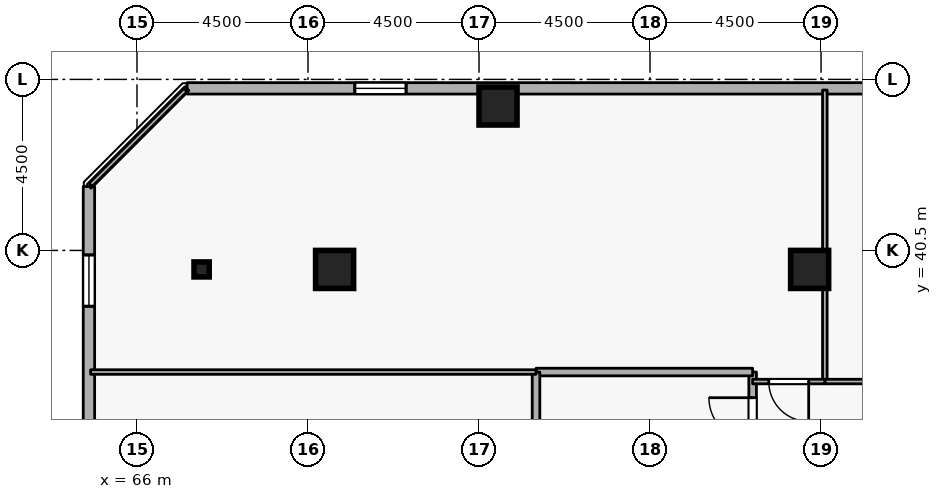
"""IFC4 building model, lengths in metres.
Left out: names, types, materials, properties, quantities, classifications, styles, units other than length and angle.
Written with IfcOpenShell. Run it as: python <this file> out.ifc"""

import sys

from ifc_helpers import new_model, si_unit, direction, frame, frame_2d, origin, origin_2d, place, context, subcontext, project, spatial, rectangle, i_section, extrude, element, fill, save


model = new_model("IFC4")
c1 = context("Model", 3, precision=1e-05, world=origin(), true_north=direction((0.0, 1.0)))
c2 = subcontext(c1, "Body", "Model", "MODEL_VIEW")
j1 = project(units=[si_unit("LENGTHUNIT", "METRE"), si_unit("PLANEANGLEUNIT", "RADIAN")], contexts=[c1])
p1 = place(None, origin())
s1 = spatial("IfcSite", under=j1, at=p1, CompositionType="ELEMENT")
p2 = place(p1, origin())
s2 = spatial("IfcBuilding", under=s1, at=p2, CompositionType="ELEMENT")
p3 = place(p2, frame((0.0, 0.0, 225.9)))
s3 = spatial("IfcBuildingStorey", under=s2, at=p3, CompositionType="ELEMENT", Elevation=225.9)
for number, where, z_axis, x_axis in (
    (1, (75.5, 44.3, 0.0), (0.0, 0.0, 1.0), (1.0, 0.0, 0.0)),
    (2, (71.2, 40.0, 0.0), (0.0, 0.0, 1.0), (1.0, 0.0, 0.0)),
    (3, (83.7, 40.0, 0.0), (0.0, 0.0, 1.0), (1.0, 0.0, 0.0)),
):
    element("IfcColumn", number, at=place(p3, frame(where, z_axis=z_axis, x_axis=x_axis)), inside=s3, PredefinedType="COLUMN", context=c2, shape_type="SweptSolid", body=[
        extrude(rectangle(XDim=1.0, YDim=1.0, at=origin_2d()), origin(), (0.0, 0.0, 1.0), 3.6),
    ])
p4 = place(p3, frame((67.7, 40.0, 0.0), z_axis=(0.0, 0.0, 1.0), x_axis=(1.0, 0.0, 0.0)))
e4 = element("IfcColumn", 4, at=p4, inside=s3, PredefinedType="COLUMN", context=c2, shape_type="SweptSolid", body=[
    extrude(i_section(OverallWidth=0.399, OverallDepth=0.394, WebThickness=0.023, FlangeThickness=0.037, FilletRadius=0.015, at=origin_2d()), origin(), (0.0, 0.0, 1.0), 3.6),
])
p5 = place(p3, frame((103.681, 44.765, 0.0), z_axis=(0.0, 0.0, 1.0), x_axis=(-1.0, 0.0, 0.0)))
e5 = element("IfcWall", 5, at=p5, inside=s3, PredefinedType="STANDARD", context=c2, shape_type="SweptSolid", body=[
    extrude(rectangle(XDim=36.363, YDim=0.3, at=frame_2d((18.181, 0.0))), origin(), (0.0, 0.0, 1.0), 2.22),
])
p6 = place(p5, frame((30.6, 0.0, 0.72)))
e6 = element("IfcOpeningElement", 6, at=p6, cuts=e5, PredefinedType="OPENING", context=c2, shape_type="SweptSolid", body=[
    extrude(rectangle(XDim=1.35, YDim=1.05, at=frame_2d((0.675, 0.525))), frame((0.0, 0.16, 0.0), z_axis=(0.0, -1.0, 0.0), x_axis=(1.0, 0.0, 0.0)), (0.0, 0.0, 1.0), 0.32),
])
p7 = place(p3, frame((64.735, 42.181, 0.0), z_axis=(0.0, 0.0, 1.0), x_axis=(0.0, -1.0, 0.0)))
e7 = element("IfcWall", 7, at=p7, inside=s3, PredefinedType="STANDARD", context=c2, shape_type="SweptSolid", body=[
    extrude(rectangle(XDim=36.363, YDim=0.3, at=frame_2d((18.181, 0.0))), origin(), (0.0, 0.0, 1.0), 2.22),
])
p8 = place(p7, frame((1.8, 0.0, 0.72)))
e8 = element("IfcOpeningElement", 8, at=p8, cuts=e7, PredefinedType="OPENING", context=c2, shape_type="SweptSolid", body=[
    extrude(rectangle(XDim=1.35, YDim=1.05, at=frame_2d((0.675, 0.525))), frame((0.0, 0.16, 0.0), z_axis=(0.0, -1.0, 0.0), x_axis=(1.0, 0.0, 0.0)), (0.0, 0.0, 1.0), 0.32),
])
p9 = place(p7, frame((6.6, 0.0, 0.72)))
e9 = element("IfcOpeningElement", 9, at=p9, cuts=e7, PredefinedType="OPENING", context=c2, shape_type="SweptSolid", body=[
    extrude(rectangle(XDim=1.35, YDim=1.05, at=frame_2d((0.675, 0.525))), frame((0.0, 0.16, 0.0), z_axis=(0.0, -1.0, 0.0), x_axis=(1.0, 0.0, 0.0)), (0.0, 0.0, 1.0), 0.32),
])
p10 = place(p7, frame((11.4, 0.0, 0.72)))
e10 = element("IfcOpeningElement", 10, at=p10, cuts=e7, PredefinedType="OPENING", context=c2, shape_type="SweptSolid", body=[
    extrude(rectangle(XDim=1.35, YDim=1.05, at=frame_2d((0.675, 0.525))), frame((0.0, 0.16, 0.0), z_axis=(0.0, -1.0, 0.0), x_axis=(1.0, 0.0, 0.0)), (0.0, 0.0, 1.0), 0.32),
])
p11 = place(p7, frame((16.2, 0.0, 0.72)))
e11 = element("IfcOpeningElement", 11, at=p11, cuts=e7, PredefinedType="OPENING", context=c2, shape_type="SweptSolid", body=[
    extrude(rectangle(XDim=1.35, YDim=1.05, at=frame_2d((0.675, 0.525))), frame((0.0, 0.16, 0.0), z_axis=(0.0, -1.0, 0.0), x_axis=(1.0, 0.0, 0.0)), (0.0, 0.0, 1.0), 0.32),
])
p12 = place(p7, frame((21.0, 0.0, 0.72)))
e12 = element("IfcOpeningElement", 12, at=p12, cuts=e7, PredefinedType="OPENING", context=c2, shape_type="SweptSolid", body=[
    extrude(rectangle(XDim=1.35, YDim=1.05, at=frame_2d((0.675, 0.525))), frame((0.0, 0.16, 0.0), z_axis=(0.0, -1.0, 0.0), x_axis=(1.0, 0.0, 0.0)), (0.0, 0.0, 1.0), 0.32),
])
p13 = place(p7, frame((30.6, 0.0, 0.72)))
e13 = element("IfcOpeningElement", 13, at=p13, cuts=e7, PredefinedType="OPENING", context=c2, shape_type="SweptSolid", body=[
    extrude(rectangle(XDim=1.35, YDim=1.05, at=frame_2d((0.675, 0.525))), frame((0.0, 0.16, 0.0), z_axis=(0.0, -1.0, 0.0), x_axis=(1.0, 0.0, 0.0)), (0.0, 0.0, 1.0), 0.32),
])
p14 = place(p3, frame((82.2, 34.8, 0.0), z_axis=(0.0, 0.0, 1.0), x_axis=(0.0, 1.0, 0.0)))
e14 = element("IfcWall", 14, at=p14, inside=s3, PredefinedType="STANDARD", context=c2, shape_type="SweptSolid", body=[
    extrude(rectangle(XDim=2.5, YDim=0.2, at=frame_2d((1.25, 0.0))), origin(), (0.0, 0.0, 1.0), 3.3),
])
p15 = place(p14, frame((0.675, 0.0, 0.0)))
e15 = element("IfcOpeningElement", 15, at=p15, cuts=e14, PredefinedType="OPENING", context=c2, shape_type="SweptSolid", body=[
    extrude(rectangle(XDim=1.15, YDim=2.1, at=frame_2d((0.575, 1.05))), frame((0.0, 0.11, 0.0), z_axis=(0.0, -1.0, 0.0), x_axis=(1.0, 0.0, 0.0)), (0.0, 0.0, 1.0), 0.22),
])
p16 = place(p3, frame((82.2, 37.3, 0.0), z_axis=(0.0, 0.0, 1.0), x_axis=(-1.0, 0.0, 0.0)))
e16 = element("IfcWall", 16, at=p16, inside=s3, PredefinedType="STANDARD", context=c2, shape_type="SweptSolid", body=[
    extrude(rectangle(XDim=5.7, YDim=0.2, at=frame_2d((2.85, 0.0))), origin(), (0.0, 0.0, 1.0), 3.3),
])
p17 = place(p3, frame((76.5, 37.3, 0.0), z_axis=(0.0, 0.0, 1.0), x_axis=(0.0, -1.0, 0.0)))
e17 = element("IfcWall", 17, at=p17, inside=s3, PredefinedType="STANDARD", context=c2, shape_type="SweptSolid", body=[
    extrude(rectangle(XDim=2.5, YDim=0.2, at=frame_2d((1.25, 0.0))), origin(), (0.0, 0.0, 1.0), 3.3),
])
p18 = place(p3, frame((84.1, 37.05, 0.0), z_axis=(0.0, 0.0, 1.0), x_axis=(0.0, 1.0, 0.0)))
e18 = element("IfcWall", 18, at=p18, inside=s3, PredefinedType="PARTITIONING", context=c2, shape_type="SweptSolid", body=[
    extrude(rectangle(XDim=7.67, YDim=0.12, at=frame_2d((3.835, 0.0))), origin(), (0.0, 0.0, 1.0), 3.3),
])
p19 = place(p3, frame((88.9, 37.05, 0.0), z_axis=(0.0, 0.0, 1.0), x_axis=(-1.0, 0.0, 0.0)))
e19 = element("IfcWall", 19, at=p19, inside=s3, PredefinedType="PARTITIONING", context=c2, shape_type="SweptSolid", body=[
    extrude(rectangle(XDim=4.8, YDim=0.12, at=frame_2d((2.4, 0.0))), origin(), (0.0, 0.0, 1.0), 3.3),
])
p20 = place(p19, frame((1.925, 0.0, 0.0)))
e20 = element("IfcOpeningElement", 20, at=p20, cuts=e19, PredefinedType="OPENING", context=c2, shape_type="SweptSolid", body=[
    extrude(rectangle(XDim=0.95, YDim=2.1, at=frame_2d((0.475, 1.05))), frame((0.0, 0.07, 0.0), z_axis=(0.0, -1.0, 0.0), x_axis=(1.0, 0.0, 0.0)), (0.0, 0.0, 1.0), 0.14),
])
p21 = place(p3, frame((76.5, 37.3, 0.0), z_axis=(0.0, 0.0, 1.0), x_axis=(-1.0, 0.0, 0.0)))
e21 = element("IfcWall", 21, at=p21, inside=s3, PredefinedType="PARTITIONING", context=c2, shape_type="SweptSolid", body=[
    extrude(rectangle(XDim=11.72, YDim=0.12, at=frame_2d((5.86, 0.0))), origin(), (0.0, 0.0, 1.0), 3.3),
])
p22 = place(p3, frame((64.78, 42.225, 0.0), z_axis=(0.0, 0.0, 1.0), x_axis=(0.707106781187, 0.707106781187, 0.0)))
e22 = element("IfcWall", 22, at=p22, inside=s3, PredefinedType="PARTITIONING", context=c2, shape_type="SweptSolid", body=[
    extrude(rectangle(XDim=3.528, YDim=0.12, at=frame_2d((1.764, 0.0))), origin(), (0.0, 0.0, 1.0), 3.3),
])
p23 = place(p3, frame((84.1, 37.05, 0.0), z_axis=(0.0, 0.0, 1.0), x_axis=(-1.0, 0.0, 0.0)))
e23 = element("IfcWall", 23, at=p23, inside=s3, PredefinedType="PARTITIONING", context=c2, shape_type="SweptSolid", body=[
    extrude(rectangle(XDim=1.9, YDim=0.12, at=frame_2d((0.95, 0.0))), origin(), (0.0, 0.0, 1.0), 3.3),
])
p24 = place(p23, frame((0.425, 0.0, 0.0)))
e24 = element("IfcOpeningElement", 24, at=p24, cuts=e23, PredefinedType="OPENING", context=c2, shape_type="SweptSolid", body=[
    extrude(rectangle(XDim=1.05, YDim=2.1, at=frame_2d((0.525, 1.05))), frame((0.0, 0.07, 0.0), z_axis=(0.0, -1.0, 0.0), x_axis=(1.0, 0.0, 0.0)), (0.0, 0.0, 1.0), 0.14),
])
p25 = place(p6, origin())
e25 = element("IfcWindow", 25, at=p25, inside=s3, PartitioningType="SINGLE_PANEL", PredefinedType="WINDOW", context=c2, shape_type="SweptSolid", body=[
    extrude(rectangle(XDim=1.35, YDim=1.05, at=frame_2d((0.675, 0.525))), frame((0.0, 0.03, 0.0), z_axis=(0.0, -1.0, 0.0), x_axis=(1.0, 0.0, 0.0)), (0.0, 0.0, 1.0), 0.06),
])
fill(e6, e25)
p26 = place(p8, origin())
e26 = element("IfcWindow", 26, at=p26, inside=s3, PartitioningType="SINGLE_PANEL", PredefinedType="WINDOW", context=c2, shape_type="SweptSolid", body=[
    extrude(rectangle(XDim=1.35, YDim=1.05, at=frame_2d((0.675, 0.525))), frame((0.0, 0.03, 0.0), z_axis=(0.0, -1.0, 0.0), x_axis=(1.0, 0.0, 0.0)), (0.0, 0.0, 1.0), 0.06),
])
fill(e8, e26)
p27 = place(p15, origin())
e27 = element("IfcDoor", 27, at=p27, inside=s3, OperationType="SINGLE_SWING_RIGHT", PredefinedType="DOOR", context=c2, shape_type="SweptSolid", body=[
    extrude(rectangle(XDim=1.15, YDim=2.1, at=frame_2d((0.575, 1.05))), frame((0.0, 0.025, 0.0), z_axis=(0.0, -1.0, 0.0), x_axis=(1.0, 0.0, 0.0)), (0.0, 0.0, 1.0), 0.05),
])
fill(e15, e27)
p28 = place(p24, origin())
e28 = element("IfcDoor", 28, at=p28, inside=s3, OperationType="SINGLE_SWING_LEFT", PredefinedType="DOOR", context=c2, shape_type="SweptSolid", body=[
    extrude(rectangle(XDim=1.05, YDim=2.1, at=frame_2d((0.525, 1.05))), frame((0.0, 0.025, 0.0), z_axis=(0.0, -1.0, 0.0), x_axis=(1.0, 0.0, 0.0)), (0.0, 0.0, 1.0), 0.05),
])
fill(e24, e28)
save(model, sys.argv[1])
